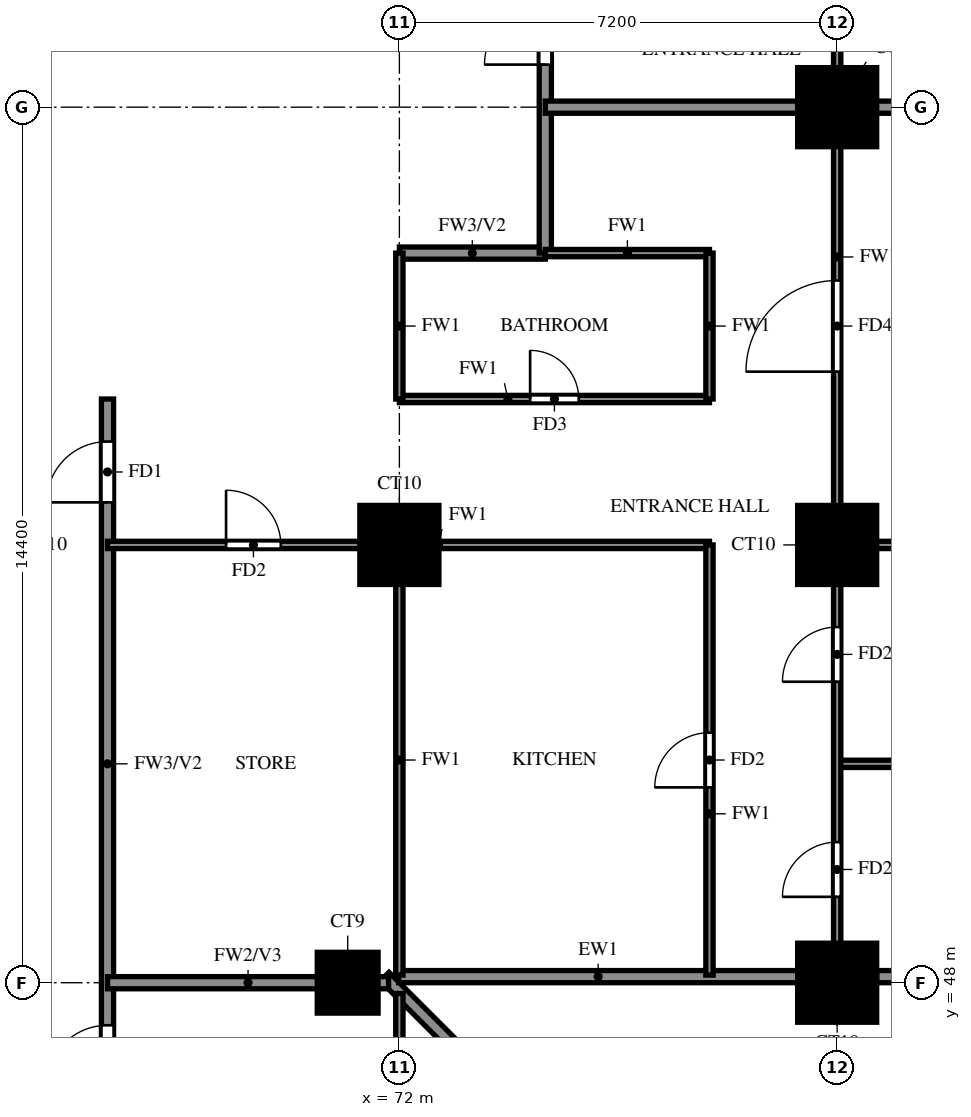
"""IFC4 building model, lengths in metres.
Left out: names, types, materials, properties, quantities, classifications, styles, units other than length and angle.
Written with IfcOpenShell. Run it as: python <this file> out.ifc"""

import sys

from ifc_helpers import new_model, si_unit, direction, frame, frame_2d, origin, origin_2d, place, context, subcontext, project, spatial, rectangle, extrude, source, transform, mapped, element, fill, save


model = new_model("IFC4")
c1 = context("Model", 3, precision=1e-05, world=origin(), true_north=direction((0.0, 1.0)))
c2 = subcontext(c1, "Body", "Model", "MODEL_VIEW")
j1 = project(units=[si_unit("LENGTHUNIT", "METRE"), si_unit("PLANEANGLEUNIT", "RADIAN")], contexts=[c1])
p1 = place(None, origin())
s1 = spatial("IfcSite", under=j1, at=p1, CompositionType="ELEMENT")
p2 = place(p1, origin())
s2 = spatial("IfcBuilding", under=s1, at=p2, CompositionType="ELEMENT")
p3 = place(p2, frame((0.0, 0.0, 65.5)))
s3 = spatial("IfcBuildingStorey", under=s2, at=p3, CompositionType="ELEMENT", Elevation=65.5)
m1 = source(origin(), c2, "Body", "SweptSolid", [
    extrude(rectangle(XDim=1.0, YDim=1.0, at=origin_2d()), origin(), (0.0, 0.0, 1.0), 3.18),
])
p4 = place(p3, frame((71.15, 48.0, 0.0), z_axis=(0.0, 0.0, 1.0), x_axis=(1.0, 0.0, 0.0)))
e1 = element("IfcColumn", 1, at=p4, inside=s3, PredefinedType="COLUMN", context=c2, shape_type="MappedRepresentation", body=[
    mapped(m1, transform((0.0, 0.0, 0.0))),
])
m2 = source(origin(), c2, "Body", "SweptSolid", [
    extrude(rectangle(XDim=1.3, YDim=1.3, at=origin_2d()), origin(), (0.0, 0.0, 1.0), 3.18),
])
for number, where, z_axis, x_axis in (
    (2, (79.2, 48.0, 0.0), (0.0, 0.0, 1.0), (1.0, 0.0, 0.0)),
    (3, (72.0, 55.2, 0.0), (0.0, 0.0, 1.0), (1.0, 0.0, 0.0)),
    (4, (79.2, 55.2, 0.0), (0.0, 0.0, 1.0), (1.0, 0.0, 0.0)),
    (5, (79.2, 62.4, 0.0), (0.0, 0.0, 1.0), (1.0, 0.0, 0.0)),
):
    element("IfcColumn", number, at=place(p3, frame(where, z_axis=z_axis, x_axis=x_axis)), inside=s3, PredefinedType="COLUMN", context=c2, shape_type="MappedRepresentation", body=[
        mapped(m2, transform((0.0, 0.0, 0.0))),
    ])
p5 = place(p3, frame((85.996, 33.863, 0.0), z_axis=(0.0, 0.0, 1.0), x_axis=(-0.707100718496, 0.707112843825, 0.0)))
e6 = element("IfcWall", 6, at=p5, inside=s3, PredefinedType="SOLIDWALL", context=c2, shape_type="SweptSolid", body=[
    extrude(rectangle(XDim=20.135, YDim=0.2, at=frame_2d((10.067, 0.0))), origin(), (0.0, 0.0, 1.0), 3.18),
])
p6 = place(p3, frame((71.989, 48.1, 0.0), z_axis=(0.0, 0.0, 1.0), x_axis=(1.0, 0.0, 0.0)))
e7 = element("IfcWall", 7, at=p6, inside=s3, PredefinedType="SOLIDWALL", context=c2, shape_type="SweptSolid", body=[
    extrude(rectangle(XDim=6.562, YDim=0.2, at=frame_2d((3.281, 0.0))), origin(), (0.0, 0.0, 1.0), 3.18),
])
p7 = place(p3, frame((79.85, 48.1, 0.0), z_axis=(0.0, 0.0, 1.0), x_axis=(1.0, 0.0, 0.0)))
e8 = element("IfcWall", 8, at=p7, inside=s3, PredefinedType="SOLIDWALL", context=c2, shape_type="SweptSolid", body=[
    extrude(rectangle(XDim=5.45, YDim=0.2, at=frame_2d((2.725, 0.0))), origin(), (0.0, 0.0, 1.0), 3.18),
])
p8 = place(p7, frame((1.525, 0.0, 0.6)))
e9 = element("IfcOpeningElement", 9, at=p8, cuts=e8, PredefinedType="OPENING", context=c2, shape_type="SweptSolid", body=[
    extrude(rectangle(XDim=2.4, YDim=2.4, at=frame_2d((1.2, 1.2))), frame((0.0, 0.11, 0.0), z_axis=(0.0, -1.0, 0.0), x_axis=(1.0, 0.0, 0.0)), (0.0, 0.0, 1.0), 0.22),
])
p9 = place(p3, frame((72.0, 60.0, 0.0), z_axis=(0.0, 0.0, 1.0), x_axis=(1.0, 0.0, 0.0)))
e10 = element("IfcWall", 10, at=p9, inside=s3, PredefinedType="SOLIDWALL", context=c2, shape_type="SweptSolid", body=[
    extrude(rectangle(XDim=2.4, YDim=0.2, at=frame_2d((1.2, 0.0))), origin(), (0.0, 0.0, 1.0), 3.18),
])
p10 = place(p3, frame((67.2, 45.6, 0.0), z_axis=(0.0, 0.0, 1.0), x_axis=(0.0, 1.0, 0.0)))
e11 = element("IfcWall", 11, at=p10, inside=s3, PredefinedType="SOLIDWALL", context=c2, shape_type="SweptSolid", body=[
    extrude(rectangle(XDim=12.0, YDim=0.2, at=frame_2d((6.0, 0.0))), origin(), (0.0, 0.0, 1.0), 3.18),
])
p11 = place(p10, frame((10.3, 0.0, 0.0)))
e12 = element("IfcOpeningElement", 12, at=p11, cuts=e11, PredefinedType="OPENING", context=c2, shape_type="SweptSolid", body=[
    extrude(rectangle(XDim=1.0, YDim=2.1, at=frame_2d((0.5, 1.05))), frame((0.0, 0.11, 0.0), z_axis=(0.0, -1.0, 0.0), x_axis=(1.0, 0.0, 0.0)), (0.0, 0.0, 1.0), 0.22),
])
p12 = place(p10, frame((0.7, 0.0, 0.0)))
e13 = element("IfcOpeningElement", 13, at=p12, cuts=e11, PredefinedType="OPENING", context=c2, shape_type="SweptSolid", body=[
    extrude(rectangle(XDim=1.0, YDim=2.1, at=frame_2d((0.5, 1.05))), frame((0.0, 0.11, 0.0), z_axis=(0.0, -1.0, 0.0), x_axis=(1.0, 0.0, 0.0)), (0.0, 0.0, 1.0), 0.22),
])
p13 = place(p3, frame((74.4, 60.0, 0.0), z_axis=(0.0, 0.0, 1.0), x_axis=(0.0, 1.0, 0.0)))
e14 = element("IfcWall", 14, at=p13, inside=s3, PredefinedType="SOLIDWALL", context=c2, shape_type="SweptSolid", body=[
    extrude(rectangle(XDim=9.6, YDim=0.2, at=frame_2d((4.8, 0.0))), origin(), (0.0, 0.0, 1.0), 3.18),
])
p14 = place(p13, frame((3.1, 0.0, 0.0)))
e15 = element("IfcOpeningElement", 15, at=p14, cuts=e14, PredefinedType="OPENING", context=c2, shape_type="SweptSolid", body=[
    extrude(rectangle(XDim=1.0, YDim=2.1, at=frame_2d((0.5, 1.05))), frame((0.0, 0.11, 0.0), z_axis=(0.0, -1.0, 0.0), x_axis=(1.0, 0.0, 0.0)), (0.0, 0.0, 1.0), 0.22),
])
p15 = place(p3, frame((67.2, 48.0, 0.0), z_axis=(0.0, 0.0, 1.0), x_axis=(1.0, 0.0, 0.0)))
e16 = element("IfcWall", 16, at=p15, inside=s3, PredefinedType="SOLIDWALL", context=c2, shape_type="SweptSolid", body=[
    extrude(rectangle(XDim=4.623, YDim=0.2, at=frame_2d((2.312, 0.0))), origin(), (0.0, 0.0, 1.0), 3.18),
])
p16 = place(p3, frame((74.4, 62.4, 0.0), z_axis=(0.0, 0.0, 1.0), x_axis=(1.0, 0.0, 0.0)))
e17 = element("IfcWall", 17, at=p16, inside=s3, PredefinedType="SOLIDWALL", context=c2, shape_type="SweptSolid", body=[
    extrude(rectangle(XDim=11.875, YDim=0.2, at=frame_2d((5.938, 0.0))), origin(), (0.0, 0.0, 1.0), 3.18),
])
p17 = place(p3, frame((79.2, 51.6, 0.0), z_axis=(0.0, 0.0, 1.0), x_axis=(1.0, 0.0, 0.0)))
e18 = element("IfcWall", 18, at=p17, inside=s3, PredefinedType="PARTITIONING", context=c2, shape_type="SweptSolid", body=[
    extrude(rectangle(XDim=7.075, YDim=0.12, at=frame_2d((3.538, 0.0))), origin(), (0.0, 0.0, 1.0), 2.28),
])
p18 = place(p3, frame((67.2, 55.2, 0.0), z_axis=(0.0, 0.0, 1.0), x_axis=(1.0, 0.0, 0.0)))
e19 = element("IfcWall", 19, at=p18, inside=s3, PredefinedType="PARTITIONING", context=c2, shape_type="SweptSolid", body=[
    extrude(rectangle(XDim=9.9, YDim=0.12, at=frame_2d((4.95, 0.0))), origin(), (0.0, 0.0, 1.0), 3.18),
])
p19 = place(p18, frame((1.95, 0.0, 0.0)))
e20 = element("IfcOpeningElement", 20, at=p19, cuts=e19, PredefinedType="OPENING", context=c2, shape_type="SweptSolid", body=[
    extrude(rectangle(XDim=0.9, YDim=2.1, at=frame_2d((0.45, 1.05))), frame((0.0, 0.07, 0.0), z_axis=(0.0, -1.0, 0.0), x_axis=(1.0, 0.0, 0.0)), (0.0, 0.0, 1.0), 0.14),
])
p20 = place(p3, frame((79.2, 55.2, 0.0), z_axis=(0.0, 0.0, 1.0), x_axis=(1.0, 0.0, 0.0)))
e21 = element("IfcWall", 21, at=p20, inside=s3, PredefinedType="PARTITIONING", context=c2, shape_type="SweptSolid", body=[
    extrude(rectangle(XDim=7.075, YDim=0.12, at=frame_2d((3.538, 0.0))), origin(), (0.0, 0.0, 1.0), 3.18),
])
p21 = place(p3, frame((72.0, 57.6, 0.0), z_axis=(0.0, 0.0, 1.0), x_axis=(1.0, 0.0, 0.0)))
e22 = element("IfcWall", 22, at=p21, inside=s3, PredefinedType="PARTITIONING", context=c2, shape_type="SweptSolid", body=[
    extrude(rectangle(XDim=5.1, YDim=0.12, at=frame_2d((2.55, 0.0))), origin(), (0.0, 0.0, 1.0), 3.18),
])
p22 = place(p21, frame((2.15, 0.0, 0.0)))
e23 = element("IfcOpeningElement", 23, at=p22, cuts=e22, PredefinedType="OPENING", context=c2, shape_type="SweptSolid", body=[
    extrude(rectangle(XDim=0.8, YDim=2.1, at=frame_2d((0.4, 1.05))), frame((0.0, 0.07, 0.0), z_axis=(0.0, -1.0, 0.0), x_axis=(1.0, 0.0, 0.0)), (0.0, 0.0, 1.0), 0.14),
])
p23 = place(p3, frame((74.4, 60.0, 0.0), z_axis=(0.0, 0.0, 1.0), x_axis=(1.0, 0.0, 0.0)))
e24 = element("IfcWall", 24, at=p23, inside=s3, PredefinedType="PARTITIONING", context=c2, shape_type="SweptSolid", body=[
    extrude(rectangle(XDim=2.7, YDim=0.12, at=frame_2d((1.35, 0.0))), origin(), (0.0, 0.0, 1.0), 3.18),
])
p24 = place(p3, frame((72.0, 33.725, 0.0), z_axis=(0.0, 0.0, 1.0), x_axis=(0.0, 1.0, 0.0)))
e25 = element("IfcWall", 25, at=p24, inside=s3, PredefinedType="PARTITIONING", context=c2, shape_type="SweptSolid", body=[
    extrude(rectangle(XDim=14.098, YDim=0.12, at=frame_2d((7.049, 0.0))), origin(), (0.0, 0.0, 1.0), 2.28),
])
p25 = place(p24, frame((10.075, 0.0, 0.0)))
e26 = element("IfcOpeningElement", 26, at=p25, cuts=e25, PredefinedType="OPENING", context=c2, shape_type="SweptSolid", body=[
    extrude(rectangle(XDim=0.9, YDim=2.1, at=frame_2d((0.45, 1.05))), frame((0.0, 0.07, 0.0), z_axis=(0.0, -1.0, 0.0), x_axis=(1.0, 0.0, 0.0)), (0.0, 0.0, 1.0), 0.14),
])
p26 = place(p3, frame((72.0, 48.125, 0.0), z_axis=(0.0, 0.0, 1.0), x_axis=(0.0, 1.0, 0.0)))
e27 = element("IfcWall", 27, at=p26, inside=s3, PredefinedType="PARTITIONING", context=c2, shape_type="SweptSolid", body=[
    extrude(rectangle(XDim=7.075, YDim=0.12, at=frame_2d((3.538, 0.0))), origin(), (0.0, 0.0, 1.0), 3.18),
])
p27 = place(p3, frame((72.0, 57.6, 0.0), z_axis=(0.0, 0.0, 1.0), x_axis=(0.0, 1.0, 0.0)))
e28 = element("IfcWall", 28, at=p27, inside=s3, PredefinedType="PARTITIONING", context=c2, shape_type="SweptSolid", body=[
    extrude(rectangle(XDim=2.4, YDim=0.12, at=frame_2d((1.2, 0.0))), origin(), (0.0, 0.0, 1.0), 3.18),
])
p28 = place(p3, frame((77.1, 48.125, 0.0), z_axis=(0.0, 0.0, 1.0), x_axis=(0.0, 1.0, 0.0)))
e29 = element("IfcWall", 29, at=p28, inside=s3, PredefinedType="PARTITIONING", context=c2, shape_type="SweptSolid", body=[
    extrude(rectangle(XDim=7.075, YDim=0.12, at=frame_2d((3.538, 0.0))), origin(), (0.0, 0.0, 1.0), 3.18),
])
p29 = place(p28, frame((3.087, 0.0, 0.0)))
e30 = element("IfcOpeningElement", 30, at=p29, cuts=e29, PredefinedType="OPENING", context=c2, shape_type="SweptSolid", body=[
    extrude(rectangle(XDim=0.9, YDim=2.1, at=frame_2d((0.45, 1.05))), frame((0.0, 0.07, 0.0), z_axis=(0.0, -1.0, 0.0), x_axis=(1.0, 0.0, 0.0)), (0.0, 0.0, 1.0), 0.14),
])
p30 = place(p3, frame((77.1, 57.6, 0.0), z_axis=(0.0, 0.0, 1.0), x_axis=(0.0, 1.0, 0.0)))
e31 = element("IfcWall", 31, at=p30, inside=s3, PredefinedType="PARTITIONING", context=c2, shape_type="SweptSolid", body=[
    extrude(rectangle(XDim=2.4, YDim=0.12, at=frame_2d((1.2, 0.0))), origin(), (0.0, 0.0, 1.0), 3.18),
])
p31 = place(p3, frame((79.2, 48.125, 0.0), z_axis=(0.0, 0.0, 1.0), x_axis=(0.0, 1.0, 0.0)))
e32 = element("IfcWall", 32, at=p31, inside=s3, PredefinedType="PARTITIONING", context=c2, shape_type="SweptSolid", body=[
    extrude(rectangle(XDim=21.475, YDim=0.12, at=frame_2d((10.738, 0.0))), origin(), (0.0, 0.0, 1.0), 3.18),
])
p32 = place(p31, frame((1.288, 0.0, 0.0)))
e33 = element("IfcOpeningElement", 33, at=p32, cuts=e32, PredefinedType="OPENING", context=c2, shape_type="SweptSolid", body=[
    extrude(rectangle(XDim=0.9, YDim=2.1, at=frame_2d((0.45, 1.05))), frame((0.0, 0.07, 0.0), z_axis=(0.0, -1.0, 0.0), x_axis=(1.0, 0.0, 0.0)), (0.0, 0.0, 1.0), 0.14),
])
p33 = place(p31, frame((4.825, 0.0, 0.0)))
e34 = element("IfcOpeningElement", 34, at=p33, cuts=e32, PredefinedType="OPENING", context=c2, shape_type="SweptSolid", body=[
    extrude(rectangle(XDim=0.9, YDim=2.1, at=frame_2d((0.45, 1.05))), frame((0.0, 0.07, 0.0), z_axis=(0.0, -1.0, 0.0), x_axis=(1.0, 0.0, 0.0)), (0.0, 0.0, 1.0), 0.14),
])
p34 = place(p31, frame((9.925, 0.0, 0.0)))
e35 = element("IfcOpeningElement", 35, at=p34, cuts=e32, PredefinedType="OPENING", context=c2, shape_type="SweptSolid", body=[
    extrude(rectangle(XDim=1.5, YDim=2.1, at=frame_2d((0.75, 1.05))), frame((0.0, 0.07, 0.0), z_axis=(0.0, -1.0, 0.0), x_axis=(1.0, 0.0, 0.0)), (0.0, 0.0, 1.0), 0.14),
])
p35 = place(p31, frame((15.625, 0.0, 0.0)))
e36 = element("IfcOpeningElement", 36, at=p35, cuts=e32, PredefinedType="OPENING", context=c2, shape_type="SweptSolid", body=[
    extrude(rectangle(XDim=0.9, YDim=2.1, at=frame_2d((0.45, 1.05))), frame((0.0, 0.07, 0.0), z_axis=(0.0, -1.0, 0.0), x_axis=(1.0, 0.0, 0.0)), (0.0, 0.0, 1.0), 0.14),
])
p36 = place(p31, frame((19.225, 0.0, 0.0)))
e37 = element("IfcOpeningElement", 37, at=p36, cuts=e32, PredefinedType="OPENING", context=c2, shape_type="SweptSolid", body=[
    extrude(rectangle(XDim=0.9, YDim=2.1, at=frame_2d((0.45, 1.05))), frame((0.0, 0.07, 0.0), z_axis=(0.0, -1.0, 0.0), x_axis=(1.0, 0.0, 0.0)), (0.0, 0.0, 1.0), 0.14),
])
p37 = place(p11, origin())
e38 = element("IfcDoor", 38, at=p37, inside=s3, OperationType="SINGLE_SWING_LEFT", PredefinedType="DOOR", context=c2, shape_type="SweptSolid", body=[
    extrude(rectangle(XDim=1.0, YDim=2.1, at=frame_2d((0.5, 1.05))), frame((0.0, 0.025, 0.0), z_axis=(0.0, -1.0, 0.0), x_axis=(1.0, 0.0, 0.0)), (0.0, 0.0, 1.0), 0.05),
])
fill(e12, e38)
p38 = place(p32, origin())
e39 = element("IfcDoor", 39, at=p38, inside=s3, OperationType="SINGLE_SWING_RIGHT", PredefinedType="DOOR", context=c2, shape_type="SweptSolid", body=[
    extrude(rectangle(XDim=0.9, YDim=2.1, at=frame_2d((0.45, 1.05))), frame((0.0, 0.025, 0.0), z_axis=(0.0, -1.0, 0.0), x_axis=(1.0, 0.0, 0.0)), (0.0, 0.0, 1.0), 0.05),
])
fill(e33, e39)
p39 = place(p33, origin())
e40 = element("IfcDoor", 40, at=p39, inside=s3, OperationType="SINGLE_SWING_LEFT", PredefinedType="DOOR", context=c2, shape_type="SweptSolid", body=[
    extrude(rectangle(XDim=0.9, YDim=2.1, at=frame_2d((0.45, 1.05))), frame((0.0, 0.025, 0.0), z_axis=(0.0, -1.0, 0.0), x_axis=(1.0, 0.0, 0.0)), (0.0, 0.0, 1.0), 0.05),
])
fill(e34, e40)
p40 = place(p34, origin())
e41 = element("IfcDoor", 41, at=p40, inside=s3, OperationType="SINGLE_SWING_LEFT", PredefinedType="DOOR", context=c2, shape_type="SweptSolid", body=[
    extrude(rectangle(XDim=1.5, YDim=2.1, at=frame_2d((0.75, 1.05))), frame((0.0, 0.025, 0.0), z_axis=(0.0, -1.0, 0.0), x_axis=(1.0, 0.0, 0.0)), (0.0, 0.0, 1.0), 0.05),
])
fill(e35, e41)
p41 = place(p29, origin())
e42 = element("IfcDoor", 42, at=p41, inside=s3, OperationType="SINGLE_SWING_RIGHT", PredefinedType="DOOR", context=c2, shape_type="SweptSolid", body=[
    extrude(rectangle(XDim=0.9, YDim=2.1, at=frame_2d((0.45, 1.05))), frame((0.0, 0.025, 0.0), z_axis=(0.0, -1.0, 0.0), x_axis=(1.0, 0.0, 0.0)), (0.0, 0.0, 1.0), 0.05),
])
fill(e30, e42)
p42 = place(p22, origin())
e43 = element("IfcDoor", 43, at=p42, inside=s3, OperationType="SINGLE_SWING_LEFT", PredefinedType="DOOR", context=c2, shape_type="SweptSolid", body=[
    extrude(rectangle(XDim=0.8, YDim=2.1, at=frame_2d((0.4, 1.05))), frame((0.0, 0.025, 0.0), z_axis=(0.0, -1.0, 0.0), x_axis=(1.0, 0.0, 0.0)), (0.0, 0.0, 1.0), 0.05),
])
fill(e23, e43)
p43 = place(p19, origin())
e44 = element("IfcDoor", 44, at=p43, inside=s3, OperationType="SINGLE_SWING_LEFT", PredefinedType="DOOR", context=c2, shape_type="SweptSolid", body=[
    extrude(rectangle(XDim=0.9, YDim=2.1, at=frame_2d((0.45, 1.05))), frame((0.0, 0.025, 0.0), z_axis=(0.0, -1.0, 0.0), x_axis=(1.0, 0.0, 0.0)), (0.0, 0.0, 1.0), 0.05),
])
fill(e20, e44)
p44 = place(p14, origin())
e45 = element("IfcDoor", 45, at=p44, inside=s3, OperationType="SINGLE_SWING_LEFT", PredefinedType="DOOR", context=c2, shape_type="SweptSolid", body=[
    extrude(rectangle(XDim=1.0, YDim=2.1, at=frame_2d((0.5, 1.05))), frame((0.0, 0.025, 0.0), z_axis=(0.0, -1.0, 0.0), x_axis=(1.0, 0.0, 0.0)), (0.0, 0.0, 1.0), 0.05),
])
fill(e15, e45)
p45 = place(p12, origin())
e46 = element("IfcDoor", 46, at=p45, inside=s3, OperationType="SINGLE_SWING_RIGHT", PredefinedType="DOOR", context=c2, shape_type="SweptSolid", body=[
    extrude(rectangle(XDim=1.0, YDim=2.1, at=frame_2d((0.5, 1.05))), frame((0.0, 0.025, 0.0), z_axis=(0.0, -1.0, 0.0), x_axis=(1.0, 0.0, 0.0)), (0.0, 0.0, 1.0), 0.05),
])
fill(e13, e46)
save(model, sys.argv[1])
